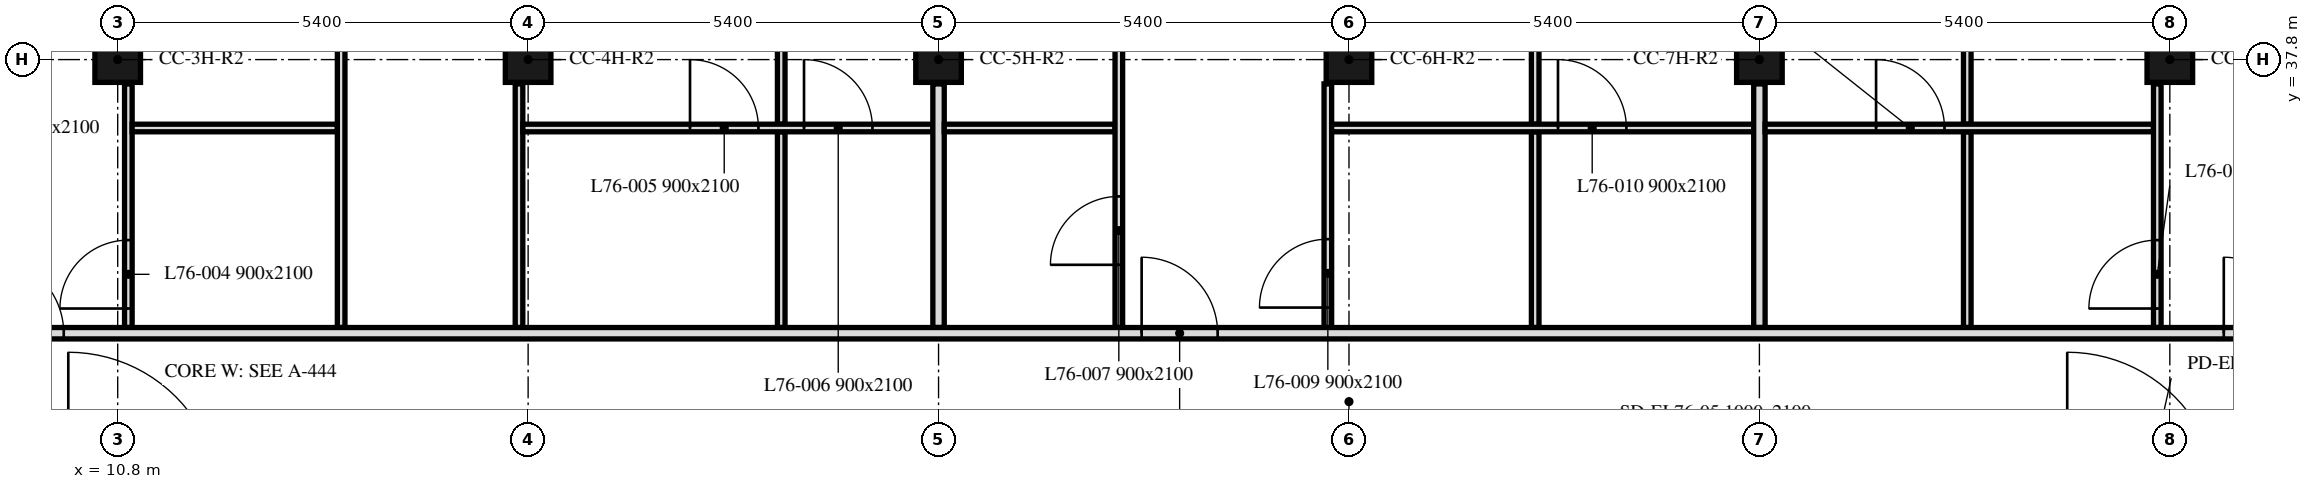
"""IFC4 building model, lengths in metres.
Left out: names, types, materials, properties, quantities, classifications, styles, units other than length and angle.
Written with IfcOpenShell. Run it as: python <this file> out.ifc"""

import sys

from ifc_helpers import new_model, si_unit, direction, frame, frame_2d, origin, origin_2d, place, context, subcontext, project, spatial, rectangle, extrude, element, fill, save


model = new_model("IFC4")
c1 = context("Model", 3, precision=1e-05, world=origin(), true_north=direction((0.0, 1.0)))
c2 = subcontext(c1, "Body", "Model", "MODEL_VIEW")
j1 = project(units=[si_unit("LENGTHUNIT", "METRE"), si_unit("PLANEANGLEUNIT", "RADIAN")], contexts=[c1])
p1 = place(None, origin())
s1 = spatial("IfcSite", under=j1, at=p1, CompositionType="ELEMENT")
p2 = place(p1, origin())
s2 = spatial("IfcBuilding", under=s1, at=p2, CompositionType="ELEMENT")
p3 = place(p2, frame((0.0, 0.0, 304.9)))
s3 = spatial("IfcBuildingStorey", under=s2, at=p3, CompositionType="ELEMENT", Elevation=304.9)
for number, where, z_axis, x_axis in (
    (1, (10.8, 37.8, 0.0), (0.0, 0.0, 1.0), (1.0, 0.0, 0.0)),
    (2, (16.2, 37.8, 0.0), (0.0, 0.0, 1.0), (1.0, 0.0, 0.0)),
    (3, (21.6, 37.8, 0.0), (0.0, 0.0, 1.0), (1.0, 0.0, 0.0)),
    (4, (27.0, 37.8, 0.0), (0.0, 0.0, 1.0), (1.0, 0.0, 0.0)),
    (5, (32.4, 37.8, 0.0), (0.0, 0.0, 1.0), (1.0, 0.0, 0.0)),
    (6, (37.8, 37.8, 0.0), (0.0, 0.0, 1.0), (1.0, 0.0, 0.0)),
):
    element("IfcColumn", number, at=place(p3, frame(where, z_axis=z_axis, x_axis=x_axis)), inside=s3, PredefinedType="COLUMN", context=c2, shape_type="SweptSolid", body=[
        extrude(rectangle(XDim=0.6, YDim=0.6, at=origin_2d()), origin(), (0.0, 0.0, 1.0), 2.8),
    ])
p4 = place(p3, frame((10.94, 34.275, 0.0), z_axis=(0.0, 0.0, 1.0), x_axis=(0.0, 1.0, 0.0)))
e7 = element("IfcWall", 7, at=p4, inside=s3, PredefinedType="PARTITIONING", context=c2, shape_type="SweptSolid", body=[
    extrude(rectangle(XDim=3.205, YDim=0.1, at=frame_2d((1.603, 0.0))), origin(), (0.0, 0.0, 1.0), 2.2),
])
p5 = place(p4, frame((0.25, 0.0, 0.0)))
e8 = element("IfcOpeningElement", 8, at=p5, cuts=e7, PredefinedType="OPENING", context=c2, shape_type="SweptSolid", body=[
    extrude(rectangle(XDim=0.9, YDim=2.1, at=frame_2d((0.45, 1.05))), frame((0.0, 0.05, 0.0), z_axis=(0.0, -1.0, 0.0), x_axis=(1.0, 0.0, 0.0)), (0.0, 0.0, 1.0), 0.1),
])
p6 = place(p3, frame((10.99, 36.9, 0.0), z_axis=(0.0, 0.0, 1.0), x_axis=(1.0, 0.0, 0.0)))
e9 = element("IfcWall", 9, at=p6, inside=s3, PredefinedType="PARTITIONING", context=c2, shape_type="SweptSolid", body=[
    extrude(rectangle(XDim=2.7, YDim=0.1, at=frame_2d((1.35, 0.0))), origin(), (0.0, 0.0, 1.0), 2.8),
])
p7 = place(p3, frame((13.74, 34.275, 0.0), z_axis=(0.0, 0.0, 1.0), x_axis=(0.0, 1.0, 0.0)))
e10 = element("IfcWall", 10, at=p7, inside=s3, PredefinedType="PARTITIONING", context=c2, shape_type="SweptSolid", body=[
    extrude(rectangle(XDim=7.975, YDim=0.1, at=frame_2d((3.988, 0.0))), origin(), (0.0, 0.0, 1.0), 2.2),
])
p8 = place(p3, frame((16.08, 34.275, 0.0), z_axis=(0.0, 0.0, 1.0), x_axis=(0.0, 1.0, 0.0)))
e11 = element("IfcWall", 11, at=p8, inside=s3, PredefinedType="PARTITIONING", context=c2, shape_type="SweptSolid", body=[
    extrude(rectangle(XDim=3.205, YDim=0.1, at=frame_2d((1.603, 0.0))), origin(), (0.0, 0.0, 1.0), 2.2),
])
p9 = place(p3, frame((19.53, 36.95, 0.0), z_axis=(0.0, 0.0, 1.0), x_axis=(0.0, 1.0, 0.0)))
e12 = element("IfcWall", 12, at=p9, inside=s3, PredefinedType="PARTITIONING", context=c2, shape_type="SweptSolid", body=[
    extrude(rectangle(XDim=5.3, YDim=0.1, at=frame_2d((2.65, 0.0))), origin(), (0.0, 0.0, 1.0), 2.8),
])
p10 = place(p3, frame((19.53, 34.275, 0.0), z_axis=(0.0, 0.0, 1.0), x_axis=(0.0, 1.0, 0.0)))
e13 = element("IfcWall", 13, at=p10, inside=s3, PredefinedType="PARTITIONING", context=c2, shape_type="SweptSolid", body=[
    extrude(rectangle(XDim=2.575, YDim=0.1, at=frame_2d((1.288, 0.0))), origin(), (0.0, 0.0, 1.0), 2.8),
])
p11 = place(p3, frame((16.13, 36.9, 0.0), z_axis=(0.0, 0.0, 1.0), x_axis=(1.0, 0.0, 0.0)))
e14 = element("IfcWall", 14, at=p11, inside=s3, PredefinedType="PARTITIONING", context=c2, shape_type="SweptSolid", body=[
    extrude(rectangle(XDim=5.395, YDim=0.1, at=frame_2d((2.698, 0.0))), origin(), (0.0, 0.0, 1.0), 2.8),
])
p12 = place(p11, frame((2.2, 0.0, 0.0)))
e15 = element("IfcOpeningElement", 15, at=p12, cuts=e14, PredefinedType="OPENING", context=c2, shape_type="SweptSolid", body=[
    extrude(rectangle(XDim=0.9, YDim=2.1, at=frame_2d((0.45, 1.05))), frame((0.0, 0.05, 0.0), z_axis=(0.0, -1.0, 0.0), x_axis=(1.0, 0.0, 0.0)), (0.0, 0.0, 1.0), 0.1),
])
p13 = place(p11, frame((3.7, 0.0, 0.0)))
e16 = element("IfcOpeningElement", 16, at=p13, cuts=e14, PredefinedType="OPENING", context=c2, shape_type="SweptSolid", body=[
    extrude(rectangle(XDim=0.9, YDim=2.1, at=frame_2d((0.45, 1.05))), frame((0.0, 0.05, 0.0), z_axis=(0.0, -1.0, 0.0), x_axis=(1.0, 0.0, 0.0)), (0.0, 0.0, 1.0), 0.1),
])
p14 = place(p3, frame((21.6, 34.275, 0.0), z_axis=(0.0, 0.0, 1.0), x_axis=(0.0, 1.0, 0.0)))
e17 = element("IfcWall", 17, at=p14, inside=s3, PredefinedType="PARTITIONING", context=c2, shape_type="SweptSolid", body=[
    extrude(rectangle(XDim=3.205, YDim=0.15, at=frame_2d((1.603, 0.0))), origin(), (0.0, 0.0, 1.0), 2.2),
])
p15 = place(p3, frame((21.675, 36.9, 0.0), z_axis=(0.0, 0.0, 1.0), x_axis=(1.0, 0.0, 0.0)))
e18 = element("IfcWall", 18, at=p15, inside=s3, PredefinedType="PARTITIONING", context=c2, shape_type="SweptSolid", body=[
    extrude(rectangle(XDim=2.247, YDim=0.1, at=frame_2d((1.124, 0.0))), origin(), (0.0, 0.0, 1.0), 2.8),
])
p16 = place(p3, frame((23.972, 34.275, 0.0), z_axis=(0.0, 0.0, 1.0), x_axis=(0.0, 1.0, 0.0)))
e19 = element("IfcWall", 19, at=p16, inside=s3, PredefinedType="PARTITIONING", context=c2, shape_type="SweptSolid", body=[
    extrude(rectangle(XDim=7.975, YDim=0.1, at=frame_2d((3.988, 0.0))), origin(), (0.0, 0.0, 1.0), 2.8),
])
p17 = place(p16, frame((0.825, 0.0, 0.0)))
e20 = element("IfcOpeningElement", 20, at=p17, cuts=e19, PredefinedType="OPENING", context=c2, shape_type="SweptSolid", body=[
    extrude(rectangle(XDim=0.9, YDim=2.1, at=frame_2d((0.45, 1.05))), frame((0.0, 0.05, 0.0), z_axis=(0.0, -1.0, 0.0), x_axis=(1.0, 0.0, 0.0)), (0.0, 0.0, 1.0), 0.1),
])
p18 = place(p16, frame((5.037, 0.0, 0.0)))
e21 = element("IfcOpeningElement", 21, at=p18, cuts=e19, PredefinedType="OPENING", context=c2, shape_type="SweptSolid", body=[
    extrude(rectangle(XDim=0.9, YDim=2.1, at=frame_2d((0.45, 1.05))), frame((0.0, 0.05, 0.0), z_axis=(0.0, -1.0, 0.0), x_axis=(1.0, 0.0, 0.0)), (0.0, 0.0, 1.0), 0.1),
])
p19 = place(p3, frame((26.722, 34.275, 0.0), z_axis=(0.0, 0.0, 1.0), x_axis=(0.0, 1.0, 0.0)))
e22 = element("IfcWall", 22, at=p19, inside=s3, PredefinedType="PARTITIONING", context=c2, shape_type="SweptSolid", body=[
    extrude(rectangle(XDim=3.205, YDim=0.1, at=frame_2d((1.603, 0.0))), origin(), (0.0, 0.0, 1.0), 2.8),
])
p20 = place(p19, frame((0.262, 0.0, 0.0)))
e23 = element("IfcOpeningElement", 23, at=p20, cuts=e22, PredefinedType="OPENING", context=c2, shape_type="SweptSolid", body=[
    extrude(rectangle(XDim=0.9, YDim=2.1, at=frame_2d((0.45, 1.05))), frame((0.0, 0.05, 0.0), z_axis=(0.0, -1.0, 0.0), x_axis=(1.0, 0.0, 0.0)), (0.0, 0.0, 1.0), 0.1),
])
p21 = place(p3, frame((29.45, 36.95, 0.0), z_axis=(0.0, 0.0, 1.0), x_axis=(0.0, 1.0, 0.0)))
e24 = element("IfcWall", 24, at=p21, inside=s3, PredefinedType="PARTITIONING", context=c2, shape_type="SweptSolid", body=[
    extrude(rectangle(XDim=5.3, YDim=0.1, at=frame_2d((2.65, 0.0))), origin(), (0.0, 0.0, 1.0), 2.8),
])
p22 = place(p3, frame((29.45, 34.275, 0.0), z_axis=(0.0, 0.0, 1.0), x_axis=(0.0, 1.0, 0.0)))
e25 = element("IfcWall", 25, at=p22, inside=s3, PredefinedType="PARTITIONING", context=c2, shape_type="SweptSolid", body=[
    extrude(rectangle(XDim=2.575, YDim=0.1, at=frame_2d((1.288, 0.0))), origin(), (0.0, 0.0, 1.0), 2.8),
])
p23 = place(p3, frame((26.772, 36.9, 0.0), z_axis=(0.0, 0.0, 1.0), x_axis=(1.0, 0.0, 0.0)))
e26 = element("IfcWall", 26, at=p23, inside=s3, PredefinedType="PARTITIONING", context=c2, shape_type="SweptSolid", body=[
    extrude(rectangle(XDim=5.553, YDim=0.1, at=frame_2d((2.776, 0.0))), origin(), (0.0, 0.0, 1.0), 2.2),
])
p24 = place(p23, frame((2.978, 0.0, 0.0)))
e27 = element("IfcOpeningElement", 27, at=p24, cuts=e26, PredefinedType="OPENING", context=c2, shape_type="SweptSolid", body=[
    extrude(rectangle(XDim=0.9, YDim=2.1, at=frame_2d((0.45, 1.05))), frame((0.0, 0.05, 0.0), z_axis=(0.0, -1.0, 0.0), x_axis=(1.0, 0.0, 0.0)), (0.0, 0.0, 1.0), 0.1),
])
p25 = place(p3, frame((32.4, 34.275, 0.0), z_axis=(0.0, 0.0, 1.0), x_axis=(0.0, 1.0, 0.0)))
e28 = element("IfcWall", 28, at=p25, inside=s3, PredefinedType="PARTITIONING", context=c2, shape_type="SweptSolid", body=[
    extrude(rectangle(XDim=3.205, YDim=0.15, at=frame_2d((1.603, 0.0))), origin(), (0.0, 0.0, 1.0), 2.2),
])
p26 = place(p3, frame((35.135, 36.95, 0.0), z_axis=(0.0, 0.0, 1.0), x_axis=(0.0, 1.0, 0.0)))
e29 = element("IfcWall", 29, at=p26, inside=s3, PredefinedType="PARTITIONING", context=c2, shape_type="SweptSolid", body=[
    extrude(rectangle(XDim=5.3, YDim=0.1, at=frame_2d((2.65, 0.0))), origin(), (0.0, 0.0, 1.0), 2.2),
])
p27 = place(p3, frame((35.135, 34.275, 0.0), z_axis=(0.0, 0.0, 1.0), x_axis=(0.0, 1.0, 0.0)))
e30 = element("IfcWall", 30, at=p27, inside=s3, PredefinedType="PARTITIONING", context=c2, shape_type="SweptSolid", body=[
    extrude(rectangle(XDim=2.575, YDim=0.1, at=frame_2d((1.288, 0.0))), origin(), (0.0, 0.0, 1.0), 2.8),
])
p28 = place(p3, frame((32.475, 36.9, 0.0), z_axis=(0.0, 0.0, 1.0), x_axis=(1.0, 0.0, 0.0)))
e31 = element("IfcWall", 31, at=p28, inside=s3, PredefinedType="PARTITIONING", context=c2, shape_type="SweptSolid", body=[
    extrude(rectangle(XDim=5.11, YDim=0.1, at=frame_2d((2.555, 0.0))), origin(), (0.0, 0.0, 1.0), 2.8),
])
p29 = place(p28, frame((1.46, 0.0, 0.0)))
e32 = element("IfcOpeningElement", 32, at=p29, cuts=e31, PredefinedType="OPENING", context=c2, shape_type="SweptSolid", body=[
    extrude(rectangle(XDim=0.9, YDim=2.1, at=frame_2d((0.45, 1.05))), frame((0.0, 0.05, 0.0), z_axis=(0.0, -1.0, 0.0), x_axis=(1.0, 0.0, 0.0)), (0.0, 0.0, 1.0), 0.1),
])
p30 = place(p3, frame((37.635, 34.275, 0.0), z_axis=(0.0, 0.0, 1.0), x_axis=(0.0, 1.0, 0.0)))
e33 = element("IfcWall", 33, at=p30, inside=s3, PredefinedType="PARTITIONING", context=c2, shape_type="SweptSolid", body=[
    extrude(rectangle(XDim=3.205, YDim=0.1, at=frame_2d((1.603, 0.0))), origin(), (0.0, 0.0, 1.0), 2.8),
])
p31 = place(p30, frame((0.25, 0.0, 0.0)))
e34 = element("IfcOpeningElement", 34, at=p31, cuts=e33, PredefinedType="OPENING", context=c2, shape_type="SweptSolid", body=[
    extrude(rectangle(XDim=0.9, YDim=2.1, at=frame_2d((0.45, 1.05))), frame((0.0, 0.05, 0.0), z_axis=(0.0, -1.0, 0.0), x_axis=(1.0, 0.0, 0.0)), (0.0, 0.0, 1.0), 0.1),
])
p32 = place(p3, frame((6.151, 34.2, 0.0), z_axis=(0.0, 0.0, 1.0), x_axis=(1.0, 0.0, 0.0)))
e35 = element("IfcWall", 35, at=p32, inside=s3, PredefinedType="PARTITIONING", context=c2, shape_type="SweptSolid", body=[
    extrude(rectangle(XDim=41.698, YDim=0.15, at=frame_2d((20.849, 0.0))), origin(), (0.0, 0.0, 1.0), 2.2),
])
p33 = place(p32, frame((2.939, 0.0, 0.0)))
e36 = element("IfcOpeningElement", 36, at=p33, cuts=e35, PredefinedType="OPENING", context=c2, shape_type="SweptSolid", body=[
    extrude(rectangle(XDim=1.0, YDim=2.1, at=frame_2d((0.5, 1.05))), frame((0.0, 0.075, 0.0), z_axis=(0.0, -1.0, 0.0), x_axis=(1.0, 0.0, 0.0)), (0.0, 0.0, 1.0), 0.15),
])
p34 = place(p32, frame((18.121, 0.0, 0.0)))
e37 = element("IfcOpeningElement", 37, at=p34, cuts=e35, PredefinedType="OPENING", context=c2, shape_type="SweptSolid", body=[
    extrude(rectangle(XDim=1.0, YDim=2.1, at=frame_2d((0.5, 1.05))), frame((0.0, 0.075, 0.0), z_axis=(0.0, -1.0, 0.0), x_axis=(1.0, 0.0, 0.0)), (0.0, 0.0, 1.0), 0.15),
])
p35 = place(p32, frame((32.359, 0.0, 0.0)))
e38 = element("IfcOpeningElement", 38, at=p35, cuts=e35, PredefinedType="OPENING", context=c2, shape_type="SweptSolid", body=[
    extrude(rectangle(XDim=1.0, YDim=2.1, at=frame_2d((0.5, 1.05))), frame((0.0, 0.075, 0.0), z_axis=(0.0, -1.0, 0.0), x_axis=(1.0, 0.0, 0.0)), (0.0, 0.0, 1.0), 0.15),
])
p36 = place(p5, origin())
e39 = element("IfcDoor", 39, at=p36, inside=s3, OperationType="SINGLE_SWING_RIGHT", PredefinedType="DOOR", context=c2, shape_type="SweptSolid", body=[
    extrude(rectangle(XDim=0.9, YDim=2.1, at=frame_2d((0.45, 1.05))), frame((0.0, 0.025, 0.0), z_axis=(0.0, -1.0, 0.0), x_axis=(1.0, 0.0, 0.0)), (0.0, 0.0, 1.0), 0.05),
])
fill(e8, e39)
p37 = place(p12, origin())
e40 = element("IfcDoor", 40, at=p37, inside=s3, OperationType="SINGLE_SWING_LEFT", PredefinedType="DOOR", context=c2, shape_type="SweptSolid", body=[
    extrude(rectangle(XDim=0.9, YDim=2.1, at=frame_2d((0.45, 1.05))), frame((0.0, 0.025, 0.0), z_axis=(0.0, -1.0, 0.0), x_axis=(1.0, 0.0, 0.0)), (0.0, 0.0, 1.0), 0.05),
])
fill(e15, e40)
p38 = place(p13, origin())
e41 = element("IfcDoor", 41, at=p38, inside=s3, OperationType="SINGLE_SWING_LEFT", PredefinedType="DOOR", context=c2, shape_type="SweptSolid", body=[
    extrude(rectangle(XDim=0.9, YDim=2.1, at=frame_2d((0.45, 1.05))), frame((0.0, 0.025, 0.0), z_axis=(0.0, -1.0, 0.0), x_axis=(1.0, 0.0, 0.0)), (0.0, 0.0, 1.0), 0.05),
])
fill(e16, e41)
p39 = place(p17, origin())
e42 = element("IfcDoor", 42, at=p39, inside=s3, OperationType="SINGLE_SWING_RIGHT", PredefinedType="DOOR", context=c2, shape_type="SweptSolid", body=[
    extrude(rectangle(XDim=0.9, YDim=2.1, at=frame_2d((0.45, 1.05))), frame((0.0, 0.025, 0.0), z_axis=(0.0, -1.0, 0.0), x_axis=(1.0, 0.0, 0.0)), (0.0, 0.0, 1.0), 0.05),
])
fill(e20, e42)
p40 = place(p20, origin())
e43 = element("IfcDoor", 43, at=p40, inside=s3, OperationType="SINGLE_SWING_LEFT", PredefinedType="DOOR", context=c2, shape_type="SweptSolid", body=[
    extrude(rectangle(XDim=0.9, YDim=2.1, at=frame_2d((0.45, 1.05))), frame((0.0, 0.025, 0.0), z_axis=(0.0, -1.0, 0.0), x_axis=(1.0, 0.0, 0.0)), (0.0, 0.0, 1.0), 0.05),
])
fill(e23, e43)
p41 = place(p24, origin())
e44 = element("IfcDoor", 44, at=p41, inside=s3, OperationType="SINGLE_SWING_LEFT", PredefinedType="DOOR", context=c2, shape_type="SweptSolid", body=[
    extrude(rectangle(XDim=0.9, YDim=2.1, at=frame_2d((0.45, 1.05))), frame((0.0, 0.025, 0.0), z_axis=(0.0, -1.0, 0.0), x_axis=(1.0, 0.0, 0.0)), (0.0, 0.0, 1.0), 0.05),
])
fill(e27, e44)
p42 = place(p29, origin())
e45 = element("IfcDoor", 45, at=p42, inside=s3, OperationType="SINGLE_SWING_LEFT", PredefinedType="DOOR", context=c2, shape_type="SweptSolid", body=[
    extrude(rectangle(XDim=0.9, YDim=2.1, at=frame_2d((0.45, 1.05))), frame((0.0, 0.025, 0.0), z_axis=(0.0, -1.0, 0.0), x_axis=(1.0, 0.0, 0.0)), (0.0, 0.0, 1.0), 0.05),
])
fill(e32, e45)
p43 = place(p31, origin())
e46 = element("IfcDoor", 46, at=p43, inside=s3, OperationType="SINGLE_SWING_LEFT", PredefinedType="DOOR", context=c2, shape_type="SweptSolid", body=[
    extrude(rectangle(XDim=0.9, YDim=2.1, at=frame_2d((0.45, 1.05))), frame((0.0, 0.025, 0.0), z_axis=(0.0, -1.0, 0.0), x_axis=(1.0, 0.0, 0.0)), (0.0, 0.0, 1.0), 0.05),
])
fill(e34, e46)
p44 = place(p33, origin())
e47 = element("IfcDoor", 47, at=p44, inside=s3, OperationType="SINGLE_SWING_LEFT", PredefinedType="DOOR", context=c2, shape_type="SweptSolid", body=[
    extrude(rectangle(XDim=1.0, YDim=2.1, at=frame_2d((0.5, 1.05))), frame((0.0, 0.025, 0.0), z_axis=(0.0, -1.0, 0.0), x_axis=(1.0, 0.0, 0.0)), (0.0, 0.0, 1.0), 0.05),
])
fill(e36, e47)
p45 = place(p34, origin())
e48 = element("IfcDoor", 48, at=p45, inside=s3, OperationType="SINGLE_SWING_LEFT", PredefinedType="DOOR", context=c2, shape_type="SweptSolid", body=[
    extrude(rectangle(XDim=1.0, YDim=2.1, at=frame_2d((0.5, 1.05))), frame((0.0, 0.025, 0.0), z_axis=(0.0, -1.0, 0.0), x_axis=(1.0, 0.0, 0.0)), (0.0, 0.0, 1.0), 0.05),
])
fill(e37, e48)
p46 = place(p35, origin())
e49 = element("IfcDoor", 49, at=p46, inside=s3, OperationType="SINGLE_SWING_LEFT", PredefinedType="DOOR", context=c2, shape_type="SweptSolid", body=[
    extrude(rectangle(XDim=1.0, YDim=2.1, at=frame_2d((0.5, 1.05))), frame((0.0, 0.025, 0.0), z_axis=(0.0, -1.0, 0.0), x_axis=(1.0, 0.0, 0.0)), (0.0, 0.0, 1.0), 0.05),
])
fill(e38, e49)
save(model, sys.argv[1])
